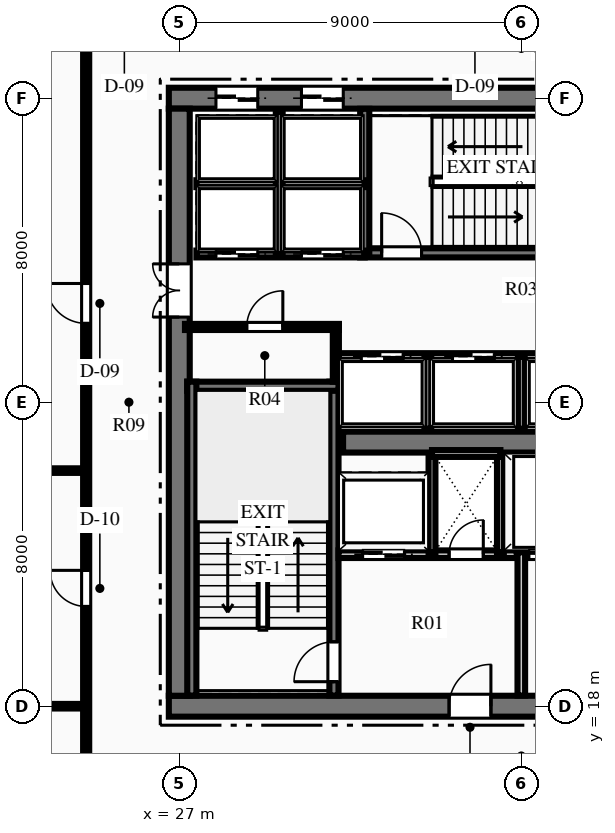
"""IFC4 building model, lengths in metres.
Left out: names, types, materials, properties, quantities, classifications, styles, units other than length and angle.
Written with IfcOpenShell. Run it as: python <this file> out.ifc"""

import sys

from ifc_helpers import new_model, si_unit, direction, frame, frame_2d, origin, place, context, subcontext, project, spatial, rectangle, extrude, element, fill, save


model = new_model("IFC4")
c1 = context("Model", 3, precision=1e-05, world=origin(), true_north=direction((0.0, 1.0)))
c2 = subcontext(c1, "Body", "Model", "MODEL_VIEW")
j1 = project(units=[si_unit("LENGTHUNIT", "METRE"), si_unit("PLANEANGLEUNIT", "RADIAN")], contexts=[c1])
p1 = place(None, origin())
s1 = spatial("IfcSite", under=j1, at=p1, CompositionType="ELEMENT")
p2 = place(p1, origin())
s2 = spatial("IfcBuilding", under=s1, at=p2, CompositionType="ELEMENT")
p3 = place(p2, frame((0.0, 0.0, 127.95)))
s3 = spatial("IfcBuildingStorey", under=s2, at=p3, CompositionType="ELEMENT", Elevation=127.95)
p4 = place(p3, frame((26.725, 18.0, 0.0), z_axis=(0.0, 0.0, 1.0), x_axis=(1.0, 0.0, 0.0)))
e1 = element("IfcWall", 1, at=p4, inside=s3, PredefinedType="SHEAR", context=c2, shape_type="SweptSolid", body=[
    extrude(rectangle(XDim=18.55, YDim=0.55, at=frame_2d((9.275, 0.0))), origin(), (0.0, 0.0, 1.0), 3.75),
])
p5 = place(p4, frame((7.375, 0.0, 0.0)))
e2 = element("IfcOpeningElement", 2, at=p5, cuts=e1, PredefinedType="OPENING", context=c2, shape_type="SweptSolid", body=[
    extrude(rectangle(XDim=1.1, YDim=2.15, at=frame_2d((0.55, 1.075))), frame((0.0, 0.285, 0.0), z_axis=(0.0, -1.0, 0.0), x_axis=(1.0, 0.0, 0.0)), (0.0, 0.0, 1.0), 0.57),
])
p6 = place(p4, frame((10.075, 0.0, 0.0)))
e3 = element("IfcOpeningElement", 3, at=p6, cuts=e1, PredefinedType="OPENING", context=c2, shape_type="SweptSolid", body=[
    extrude(rectangle(XDim=1.1, YDim=2.15, at=frame_2d((0.55, 1.075))), frame((0.0, 0.285, 0.0), z_axis=(0.0, -1.0, 0.0), x_axis=(1.0, 0.0, 0.0)), (0.0, 0.0, 1.0), 0.57),
])
p7 = place(p3, frame((26.725, 34.0, 0.0), z_axis=(0.0, 0.0, 1.0), x_axis=(1.0, 0.0, 0.0)))
e4 = element("IfcWall", 4, at=p7, inside=s3, PredefinedType="SHEAR", context=c2, shape_type="SweptSolid", body=[
    extrude(rectangle(XDim=18.55, YDim=0.55, at=frame_2d((9.275, 0.0))), origin(), (0.0, 0.0, 1.0), 3.75),
])
p8 = place(p7, frame((1.24, 0.0, 0.0)))
e5 = element("IfcOpeningElement", 5, at=p8, cuts=e4, PredefinedType="OPENING", context=c2, shape_type="SweptSolid", body=[
    extrude(rectangle(XDim=1.1, YDim=2.15, at=frame_2d((0.55, 1.075))), frame((0.0, 0.285, 0.0), z_axis=(0.0, -1.0, 0.0), x_axis=(1.0, 0.0, 0.0)), (0.0, 0.0, 1.0), 0.57),
])
p9 = place(p7, frame((3.49, 0.0, 0.0)))
e6 = element("IfcOpeningElement", 6, at=p9, cuts=e4, PredefinedType="OPENING", context=c2, shape_type="SweptSolid", body=[
    extrude(rectangle(XDim=1.1, YDim=2.15, at=frame_2d((0.55, 1.075))), frame((0.0, 0.285, 0.0), z_axis=(0.0, -1.0, 0.0), x_axis=(1.0, 0.0, 0.0)), (0.0, 0.0, 1.0), 0.57),
])
p10 = place(p7, frame((13.96, 0.0, 0.0)))
e7 = element("IfcOpeningElement", 7, at=p10, cuts=e4, PredefinedType="OPENING", context=c2, shape_type="SweptSolid", body=[
    extrude(rectangle(XDim=1.1, YDim=2.15, at=frame_2d((0.55, 1.075))), frame((0.0, 0.285, 0.0), z_axis=(0.0, -1.0, 0.0), x_axis=(1.0, 0.0, 0.0)), (0.0, 0.0, 1.0), 0.57),
])
p11 = place(p7, frame((16.21, 0.0, 0.0)))
e8 = element("IfcOpeningElement", 8, at=p11, cuts=e4, PredefinedType="OPENING", context=c2, shape_type="SweptSolid", body=[
    extrude(rectangle(XDim=1.1, YDim=2.15, at=frame_2d((0.55, 1.075))), frame((0.0, 0.285, 0.0), z_axis=(0.0, -1.0, 0.0), x_axis=(1.0, 0.0, 0.0)), (0.0, 0.0, 1.0), 0.57),
])
p12 = place(p3, frame((27.0, 18.275, 0.0), z_axis=(0.0, 0.0, 1.0), x_axis=(0.0, 1.0, 0.0)))
e9 = element("IfcWall", 9, at=p12, inside=s3, PredefinedType="SHEAR", context=c2, shape_type="SweptSolid", body=[
    extrude(rectangle(XDim=15.45, YDim=0.55, at=frame_2d((7.725, 0.0))), origin(), (0.0, 0.0, 1.0), 3.75),
])
p13 = place(p12, frame((9.965, 0.0, 0.0)))
e10 = element("IfcOpeningElement", 10, at=p13, cuts=e9, PredefinedType="OPENING", context=c2, shape_type="SweptSolid", body=[
    extrude(rectangle(XDim=1.4, YDim=2.2, at=frame_2d((0.7, 1.1))), frame((0.0, 0.285, 0.0), z_axis=(0.0, -1.0, 0.0), x_axis=(1.0, 0.0, 0.0)), (0.0, 0.0, 1.0), 0.57),
])
p14 = place(p3, frame((31.31, 24.95, 0.0), z_axis=(0.0, 0.0, 1.0), x_axis=(1.0, 0.0, 0.0)))
e11 = element("IfcWall", 11, at=p14, inside=s3, PredefinedType="SHEAR", context=c2, shape_type="SweptSolid", body=[
    extrude(rectangle(XDim=9.38, YDim=0.55, at=frame_2d((4.69, 0.0))), origin(), (0.0, 0.0, 1.0), 3.75),
])
p15 = place(p3, frame((31.07, 18.28, 0.0), z_axis=(0.0, 0.0, 1.0), x_axis=(0.0, 1.0, 0.0)))
e12 = element("IfcWall", 12, at=p15, inside=s3, PredefinedType="SHEAR", context=c2, shape_type="SweptSolid", body=[
    extrude(rectangle(XDim=8.26, YDim=0.24, at=frame_2d((4.13, 0.0))), origin(), (0.0, 0.0, 1.0), 3.75),
])
p16 = place(p15, frame((0.365, 0.0, 0.0)))
e13 = element("IfcOpeningElement", 13, at=p16, cuts=e12, PredefinedType="OPENING", context=c2, shape_type="SweptSolid", body=[
    extrude(rectangle(XDim=1.05, YDim=2.15, at=frame_2d((0.525, 1.075))), frame((0.0, 0.13, 0.0), z_axis=(0.0, -1.0, 0.0), x_axis=(1.0, 0.0, 0.0)), (0.0, 0.0, 1.0), 0.26),
])
p17 = place(p3, frame((27.21, 26.42, 0.0), z_axis=(0.0, 0.0, 1.0), x_axis=(1.0, 0.0, 0.0)))
e14 = element("IfcWall", 14, at=p17, inside=s3, PredefinedType="SHEAR", context=c2, shape_type="SweptSolid", body=[
    extrude(rectangle(XDim=3.98, YDim=0.24, at=frame_2d((1.99, 0.0))), origin(), (0.0, 0.0, 1.0), 3.75),
])
p18 = place(p3, frame((27.33, 18.28, 0.0), z_axis=(0.0, 0.0, 1.0), x_axis=(0.0, 1.0, 0.0)))
e15 = element("IfcWall", 15, at=p18, inside=s3, PredefinedType="SHEAR", context=c2, shape_type="SweptSolid", body=[
    extrude(rectangle(XDim=8.26, YDim=0.24, at=frame_2d((4.13, 0.0))), origin(), (0.0, 0.0, 1.0), 3.75),
])
p19 = place(p3, frame((31.76, 29.93, 0.0), z_axis=(0.0, 0.0, 1.0), x_axis=(1.0, 0.0, 0.0)))
e16 = element("IfcWall", 16, at=p19, inside=s3, PredefinedType="SHEAR", context=c2, shape_type="SweptSolid", body=[
    extrude(rectangle(XDim=8.38, YDim=0.24, at=frame_2d((4.19, 0.0))), origin(), (0.0, 0.0, 1.0), 3.75),
])
p20 = place(p19, frame((0.565, 0.0, 0.0)))
e17 = element("IfcOpeningElement", 17, at=p20, cuts=e16, PredefinedType="OPENING", context=c2, shape_type="SweptSolid", body=[
    extrude(rectangle(XDim=1.05, YDim=2.15, at=frame_2d((0.525, 1.075))), frame((0.0, 0.13, 0.0), z_axis=(0.0, -1.0, 0.0), x_axis=(1.0, 0.0, 0.0)), (0.0, 0.0, 1.0), 0.26),
])
p21 = place(p3, frame((31.88, 29.93, 0.0), z_axis=(0.0, 0.0, 1.0), x_axis=(0.0, 1.0, 0.0)))
e18 = element("IfcWall", 18, at=p21, inside=s3, PredefinedType="SHEAR", context=c2, shape_type="SweptSolid", body=[
    extrude(rectangle(XDim=3.79, YDim=0.24, at=frame_2d((1.895, 0.0))), origin(), (0.0, 0.0, 1.0), 3.75),
])
p22 = place(p3, frame((36.0, 18.28, 0.0), z_axis=(0.0, 0.0, 1.0), x_axis=(0.0, 1.0, 0.0)))
e19 = element("IfcWall", 19, at=p22, inside=s3, PredefinedType="PARTITIONING", context=c2, shape_type="SweptSolid", body=[
    extrude(rectangle(XDim=3.77, YDim=0.2, at=frame_2d((1.885, 0.0))), origin(), (0.0, 0.0, 1.0), 3.4),
])
p23 = place(p3, frame((31.19, 22.0, 0.0), z_axis=(0.0, 0.0, 1.0), x_axis=(1.0, 0.0, 0.0)))
e20 = element("IfcWall", 20, at=p23, inside=s3, PredefinedType="PARTITIONING", context=c2, shape_type="SweptSolid", body=[
    extrude(rectangle(XDim=4.69, YDim=0.2, at=frame_2d((2.345, 0.0))), origin(), (0.0, 0.0, 1.0), 3.4),
])
p24 = place(p23, frame((2.91, 0.0, 0.0)))
e21 = element("IfcOpeningElement", 21, at=p24, cuts=e20, PredefinedType="OPENING", context=c2, shape_type="SweptSolid", body=[
    extrude(rectangle(XDim=0.9, YDim=2.15, at=frame_2d((0.45, 1.075))), frame((0.0, 0.11, 0.0), z_axis=(0.0, -1.0, 0.0), x_axis=(1.0, 0.0, 0.0)), (0.0, 0.0, 1.0), 0.22),
])
p25 = place(p23, frame((0.635, 0.0, 0.0)))
e22 = element("IfcOpeningElement", 22, at=p25, cuts=e20, PredefinedType="OPENING", context=c2, shape_type="SweptSolid", body=[
    extrude(rectangle(XDim=1.1, YDim=2.15, at=frame_2d((0.55, 1.075))), frame((0.0, 0.11, 0.0), z_axis=(0.0, -1.0, 0.0), x_axis=(1.0, 0.0, 0.0)), (0.0, 0.0, 1.0), 0.22),
])
p26 = place(p3, frame((36.12, 22.0, 0.0), z_axis=(0.0, 0.0, 1.0), x_axis=(1.0, 0.0, 0.0)))
e23 = element("IfcWall", 23, at=p26, inside=s3, PredefinedType="PARTITIONING", context=c2, shape_type="SweptSolid", body=[
    extrude(rectangle(XDim=4.69, YDim=0.2, at=frame_2d((2.345, 0.0))), origin(), (0.0, 0.0, 1.0), 3.4),
])
p27 = place(p26, frame((2.955, 0.0, 0.0)))
e24 = element("IfcOpeningElement", 24, at=p27, cuts=e23, PredefinedType="OPENING", context=c2, shape_type="SweptSolid", body=[
    extrude(rectangle(XDim=1.1, YDim=2.15, at=frame_2d((0.55, 1.075))), frame((0.0, 0.11, 0.0), z_axis=(0.0, -1.0, 0.0), x_axis=(1.0, 0.0, 0.0)), (0.0, 0.0, 1.0), 0.22),
])
p28 = place(p26, frame((0.08, 0.0, 0.0)))
e25 = element("IfcOpeningElement", 25, at=p28, cuts=e23, PredefinedType="OPENING", context=c2, shape_type="SweptSolid", body=[
    extrude(rectangle(XDim=1.4, YDim=2.2, at=frame_2d((0.7, 1.1))), frame((0.0, 0.11, 0.0), z_axis=(0.0, -1.0, 0.0), x_axis=(1.0, 0.0, 0.0)), (0.0, 0.0, 1.0), 0.22),
])
for number, where, z_axis, x_axis in (
    (26, (33.65, 22.05, 0.0), (0.0, 0.0, 1.0), (0.0, 1.0, 0.0)),
    (27, (35.45, 22.05, 0.0), (0.0, 0.0, 1.0), (0.0, 1.0, 0.0)),
):
    element("IfcWall", number, at=place(p3, frame(where, z_axis=z_axis, x_axis=x_axis)), inside=s3, PredefinedType="PARTITIONING", context=c2, shape_type="SweptSolid", body=[
        extrude(rectangle(XDim=2.6, YDim=0.18, at=frame_2d((1.3, 0.0))), origin(), (0.0, 0.0, 1.0), 3.4),
    ])
p29 = place(p3, frame((33.65, 24.65, 0.0), z_axis=(0.0, 0.0, 1.0), x_axis=(1.0, 0.0, 0.0)))
e28 = element("IfcWall", 28, at=p29, inside=s3, PredefinedType="PARTITIONING", context=c2, shape_type="SweptSolid", body=[
    extrude(rectangle(XDim=1.8, YDim=0.18, at=frame_2d((0.9, 0.0))), origin(), (0.0, 0.0, 1.0), 3.4),
])
p30 = place(p3, frame((27.15, 27.98, 0.0), z_axis=(0.0, 0.0, 1.0), x_axis=(1.0, 0.0, 0.0)))
e29 = element("IfcWall", 29, at=p30, inside=s3, PredefinedType="PARTITIONING", context=c2, shape_type="SweptSolid", body=[
    extrude(rectangle(XDim=4.05, YDim=0.16, at=frame_2d((2.025, 0.0))), origin(), (0.0, 0.0, 1.0), 3.4),
])
p31 = place(p30, frame((1.625, 0.0, 0.0)))
e30 = element("IfcOpeningElement", 30, at=p31, cuts=e29, PredefinedType="OPENING", context=c2, shape_type="SweptSolid", body=[
    extrude(rectangle(XDim=0.95, YDim=2.15, at=frame_2d((0.475, 1.075))), frame((0.0, 0.09, 0.0), z_axis=(0.0, -1.0, 0.0), x_axis=(1.0, 0.0, 0.0)), (0.0, 0.0, 1.0), 0.18),
])
p32 = place(p3, frame((31.12, 26.54, 0.0), z_axis=(0.0, 0.0, 1.0), x_axis=(0.0, 1.0, 0.0)))
e31 = element("IfcWall", 31, at=p32, inside=s3, PredefinedType="PARTITIONING", context=c2, shape_type="SweptSolid", body=[
    extrude(rectangle(XDim=1.51, YDim=0.16, at=frame_2d((0.755, 0.0))), origin(), (0.0, 0.0, 1.0), 3.4),
])
p33 = place(p3, frame((27.45, 29.9, 0.0), z_axis=(0.0, 0.0, 1.0), x_axis=(1.0, 0.0, 0.0)))
e32 = element("IfcWall", 32, at=p33, inside=s3, PredefinedType="PARTITIONING", context=c2, shape_type="SweptSolid", body=[
    extrude(rectangle(XDim=4.43, YDim=0.18, at=frame_2d((2.215, 0.0))), origin(), (0.0, 0.0, 1.0), 3.4),
])
p34 = place(p33, frame((0.515, 0.0, 0.0)))
e33 = element("IfcOpeningElement", 33, at=p34, cuts=e32, PredefinedType="OPENING", context=c2, shape_type="SweptSolid", body=[
    extrude(rectangle(XDim=1.1, YDim=2.15, at=frame_2d((0.55, 1.075))), frame((0.0, 0.1, 0.0), z_axis=(0.0, -1.0, 0.0), x_axis=(1.0, 0.0, 0.0)), (0.0, 0.0, 1.0), 0.2),
])
p35 = place(p33, frame((2.765, 0.0, 0.0)))
e34 = element("IfcOpeningElement", 34, at=p35, cuts=e32, PredefinedType="OPENING", context=c2, shape_type="SweptSolid", body=[
    extrude(rectangle(XDim=1.1, YDim=2.15, at=frame_2d((0.55, 1.075))), frame((0.0, 0.1, 0.0), z_axis=(0.0, -1.0, 0.0), x_axis=(1.0, 0.0, 0.0)), (0.0, 0.0, 1.0), 0.2),
])
p36 = place(p3, frame((27.45, 31.75, 0.0), z_axis=(0.0, 0.0, 1.0), x_axis=(1.0, 0.0, 0.0)))
e35 = element("IfcWall", 35, at=p36, inside=s3, PredefinedType="PARTITIONING", context=c2, shape_type="SweptSolid", body=[
    extrude(rectangle(XDim=4.43, YDim=0.18, at=frame_2d((2.215, 0.0))), origin(), (0.0, 0.0, 1.0), 3.4),
])
p37 = place(p3, frame((29.63, 29.9, 0.0), z_axis=(0.0, 0.0, 1.0), x_axis=(0.0, 1.0, 0.0)))
e36 = element("IfcWall", 36, at=p37, inside=s3, PredefinedType="PARTITIONING", context=c2, shape_type="SweptSolid", body=[
    extrude(rectangle(XDim=3.75, YDim=0.18, at=frame_2d((1.875, 0.0))), origin(), (0.0, 0.0, 1.0), 3.4),
])
p38 = place(p3, frame((31.2, 27.2, 0.0), z_axis=(0.0, 0.0, 1.0), x_axis=(1.0, 0.0, 0.0)))
e37 = element("IfcWall", 37, at=p38, inside=s3, PredefinedType="PARTITIONING", context=c2, shape_type="SweptSolid", body=[
    extrude(rectangle(XDim=9.6, YDim=0.18, at=frame_2d((4.8, 0.0))), origin(), (0.0, 0.0, 1.0), 3.4),
])
p39 = place(p38, frame((0.59, 0.0, 0.0)))
e38 = element("IfcOpeningElement", 38, at=p39, cuts=e37, PredefinedType="OPENING", context=c2, shape_type="SweptSolid", body=[
    extrude(rectangle(XDim=1.1, YDim=2.15, at=frame_2d((0.55, 1.075))), frame((0.0, 0.1, 0.0), z_axis=(0.0, -1.0, 0.0), x_axis=(1.0, 0.0, 0.0)), (0.0, 0.0, 1.0), 0.2),
])
p40 = place(p38, frame((2.99, 0.0, 0.0)))
e39 = element("IfcOpeningElement", 39, at=p40, cuts=e37, PredefinedType="OPENING", context=c2, shape_type="SweptSolid", body=[
    extrude(rectangle(XDim=1.1, YDim=2.15, at=frame_2d((0.55, 1.075))), frame((0.0, 0.1, 0.0), z_axis=(0.0, -1.0, 0.0), x_axis=(1.0, 0.0, 0.0)), (0.0, 0.0, 1.0), 0.2),
])
p41 = place(p38, frame((5.51, 0.0, 0.0)))
e40 = element("IfcOpeningElement", 40, at=p41, cuts=e37, PredefinedType="OPENING", context=c2, shape_type="SweptSolid", body=[
    extrude(rectangle(XDim=1.1, YDim=2.15, at=frame_2d((0.55, 1.075))), frame((0.0, 0.1, 0.0), z_axis=(0.0, -1.0, 0.0), x_axis=(1.0, 0.0, 0.0)), (0.0, 0.0, 1.0), 0.2),
])
p42 = place(p38, frame((7.91, 0.0, 0.0)))
e41 = element("IfcOpeningElement", 41, at=p42, cuts=e37, PredefinedType="OPENING", context=c2, shape_type="SweptSolid", body=[
    extrude(rectangle(XDim=1.1, YDim=2.15, at=frame_2d((0.55, 1.075))), frame((0.0, 0.1, 0.0), z_axis=(0.0, -1.0, 0.0), x_axis=(1.0, 0.0, 0.0)), (0.0, 0.0, 1.0), 0.2),
])
for number, where, z_axis, x_axis in (
    (42, (33.54, 25.3, 0.0), (0.0, 0.0, 1.0), (0.0, 1.0, 0.0)),
    (43, (36.0, 25.3, 0.0), (0.0, 0.0, 1.0), (0.0, 1.0, 0.0)),
):
    element("IfcWall", number, at=place(p3, frame(where, z_axis=z_axis, x_axis=x_axis)), inside=s3, PredefinedType="PARTITIONING", context=c2, shape_type="SweptSolid", body=[
        extrude(rectangle(XDim=1.9, YDim=0.18, at=frame_2d((0.95, 0.0))), origin(), (0.0, 0.0, 1.0), 3.4),
    ])
p43 = place(p3, frame((24.55, 15.55, 0.0), z_axis=(0.0, 0.0, 1.0), x_axis=(0.0, 1.0, 0.0)))
e44 = element("IfcWall", 44, at=p43, inside=s3, PredefinedType="PARTITIONING", context=c2, shape_type="SweptSolid", body=[
    extrude(rectangle(XDim=20.9, YDim=0.16, at=frame_2d((10.45, 0.0))), origin(), (0.0, 0.0, 1.0), 3.4),
])
p44 = place(p43, frame((5.075, 0.0, 0.0)))
e45 = element("IfcOpeningElement", 45, at=p44, cuts=e44, PredefinedType="OPENING", context=c2, shape_type="SweptSolid", body=[
    extrude(rectangle(XDim=0.95, YDim=2.15, at=frame_2d((0.475, 1.075))), frame((0.0, 0.09, 0.0), z_axis=(0.0, -1.0, 0.0), x_axis=(1.0, 0.0, 0.0)), (0.0, 0.0, 1.0), 0.18),
])
p45 = place(p43, frame((12.524, 0.0, 0.0)))
e46 = element("IfcOpeningElement", 46, at=p45, cuts=e44, PredefinedType="OPENING", context=c2, shape_type="SweptSolid", body=[
    extrude(rectangle(XDim=1.05, YDim=2.15, at=frame_2d((0.525, 1.075))), frame((0.0, 0.09, 0.0), z_axis=(0.0, -1.0, 0.0), x_axis=(1.0, 0.0, 0.0)), (0.0, 0.0, 1.0), 0.18),
])
p46 = place(p3, frame((20.2, 18.0, 0.0), z_axis=(0.0, 0.0, 1.0), x_axis=(1.0, 0.0, 0.0)))
e47 = element("IfcWall", 47, at=p46, inside=s3, PredefinedType="PARTITIONING", context=c2, shape_type="SweptSolid", body=[
    extrude(rectangle(XDim=4.35, YDim=0.12, at=frame_2d((2.175, 0.0))), origin(), (0.0, 0.0, 1.0), 2.699),
])
p47 = place(p3, frame((20.2, 24.2, 0.0), z_axis=(0.0, 0.0, 1.0), x_axis=(1.0, 0.0, 0.0)))
e48 = element("IfcWall", 48, at=p47, inside=s3, PredefinedType="PARTITIONING", context=c2, shape_type="SweptSolid", body=[
    extrude(rectangle(XDim=4.35, YDim=0.12, at=frame_2d((2.175, 0.0))), origin(), (0.0, 0.0, 1.0), 3.4),
])
p48 = place(p31, origin())
e49 = element("IfcDoor", 49, at=p48, inside=s3, OperationType="SINGLE_SWING_RIGHT", PredefinedType="DOOR", context=c2, shape_type="SweptSolid", body=[
    extrude(rectangle(XDim=0.95, YDim=2.15, at=frame_2d((0.475, 1.075))), frame((0.0, 0.025, 0.0), z_axis=(0.0, -1.0, 0.0), x_axis=(1.0, 0.0, 0.0)), (0.0, 0.0, 1.0), 0.05),
])
fill(e30, e49)
p49 = place(p16, origin())
e50 = element("IfcDoor", 50, at=p49, inside=s3, OperationType="SINGLE_SWING_LEFT", PredefinedType="DOOR", context=c2, shape_type="SweptSolid", body=[
    extrude(rectangle(XDim=1.05, YDim=2.15, at=frame_2d((0.525, 1.075))), frame((0.0, 0.025, 0.0), z_axis=(0.0, -1.0, 0.0), x_axis=(1.0, 0.0, 0.0)), (0.0, 0.0, 1.0), 0.05),
])
fill(e13, e50)
p50 = place(p20, origin())
e51 = element("IfcDoor", 51, at=p50, inside=s3, OperationType="SINGLE_SWING_LEFT", PredefinedType="DOOR", context=c2, shape_type="SweptSolid", body=[
    extrude(rectangle(XDim=1.05, YDim=2.15, at=frame_2d((0.525, 1.075))), frame((0.0, 0.025, 0.0), z_axis=(0.0, -1.0, 0.0), x_axis=(1.0, 0.0, 0.0)), (0.0, 0.0, 1.0), 0.05),
])
fill(e17, e51)
p51 = place(p5, origin())
e52 = element("IfcDoor", 52, at=p51, inside=s3, OperationType="SINGLE_SWING_RIGHT", PredefinedType="DOOR", context=c2, shape_type="SweptSolid", body=[
    extrude(rectangle(XDim=1.1, YDim=2.15, at=frame_2d((0.55, 1.075))), frame((0.0, 0.025, 0.0), z_axis=(0.0, -1.0, 0.0), x_axis=(1.0, 0.0, 0.0)), (0.0, 0.0, 1.0), 0.05),
])
fill(e2, e52)
p52 = place(p24, origin())
e53 = element("IfcDoor", 53, at=p52, inside=s3, OperationType="SINGLE_SWING_RIGHT", PredefinedType="DOOR", context=c2, shape_type="SweptSolid", body=[
    extrude(rectangle(XDim=0.9, YDim=2.15, at=frame_2d((0.45, 1.075))), frame((0.0, 0.025, 0.0), z_axis=(0.0, -1.0, 0.0), x_axis=(1.0, 0.0, 0.0)), (0.0, 0.0, 1.0), 0.05),
])
fill(e21, e53)
p53 = place(p13, origin())
e54 = element("IfcDoor", 54, at=p53, inside=s3, OperationType="DOUBLE_DOOR_SINGLE_SWING", PredefinedType="DOOR", context=c2, shape_type="SweptSolid", body=[
    extrude(rectangle(XDim=1.4, YDim=2.2, at=frame_2d((0.7, 1.1))), frame((0.0, 0.025, 0.0), z_axis=(0.0, -1.0, 0.0), x_axis=(1.0, 0.0, 0.0)), (0.0, 0.0, 1.0), 0.05),
])
fill(e10, e54)
p54 = place(p44, origin())
e55 = element("IfcDoor", 55, at=p54, inside=s3, OperationType="SINGLE_SWING_RIGHT", PredefinedType="DOOR", context=c2, shape_type="SweptSolid", body=[
    extrude(rectangle(XDim=0.95, YDim=2.15, at=frame_2d((0.475, 1.075))), frame((0.0, 0.025, 0.0), z_axis=(0.0, -1.0, 0.0), x_axis=(1.0, 0.0, 0.0)), (0.0, 0.0, 1.0), 0.05),
])
fill(e45, e55)
p55 = place(p45, origin())
e56 = element("IfcDoor", 56, at=p55, inside=s3, OperationType="SINGLE_SWING_RIGHT", PredefinedType="DOOR", context=c2, shape_type="SweptSolid", body=[
    extrude(rectangle(XDim=1.05, YDim=2.15, at=frame_2d((0.525, 1.075))), frame((0.0, 0.025, 0.0), z_axis=(0.0, -1.0, 0.0), x_axis=(1.0, 0.0, 0.0)), (0.0, 0.0, 1.0), 0.05),
])
fill(e46, e56)
p56 = place(p34, origin())
e57 = element("IfcDoor", 57, at=p56, inside=s3, OperationType="SLIDING_TO_LEFT", PredefinedType="DOOR", context=c2, shape_type="SweptSolid", body=[
    extrude(rectangle(XDim=1.1, YDim=2.15, at=frame_2d((0.55, 1.075))), frame((0.0, 0.025, 0.0), z_axis=(0.0, -1.0, 0.0), x_axis=(1.0, 0.0, 0.0)), (0.0, 0.0, 1.0), 0.05),
])
fill(e33, e57)
p57 = place(p35, origin())
e58 = element("IfcDoor", 58, at=p57, inside=s3, OperationType="SLIDING_TO_LEFT", PredefinedType="DOOR", context=c2, shape_type="SweptSolid", body=[
    extrude(rectangle(XDim=1.1, YDim=2.15, at=frame_2d((0.55, 1.075))), frame((0.0, 0.025, 0.0), z_axis=(0.0, -1.0, 0.0), x_axis=(1.0, 0.0, 0.0)), (0.0, 0.0, 1.0), 0.05),
])
fill(e34, e58)
p58 = place(p8, origin())
e59 = element("IfcDoor", 59, at=p58, inside=s3, OperationType="SLIDING_TO_LEFT", PredefinedType="DOOR", context=c2, shape_type="SweptSolid", body=[
    extrude(rectangle(XDim=1.1, YDim=2.15, at=frame_2d((0.55, 1.075))), frame((0.0, 0.025, 0.0), z_axis=(0.0, -1.0, 0.0), x_axis=(1.0, 0.0, 0.0)), (0.0, 0.0, 1.0), 0.05),
])
fill(e5, e59)
p59 = place(p9, origin())
e60 = element("IfcDoor", 60, at=p59, inside=s3, OperationType="SLIDING_TO_LEFT", PredefinedType="DOOR", context=c2, shape_type="SweptSolid", body=[
    extrude(rectangle(XDim=1.1, YDim=2.15, at=frame_2d((0.55, 1.075))), frame((0.0, 0.025, 0.0), z_axis=(0.0, -1.0, 0.0), x_axis=(1.0, 0.0, 0.0)), (0.0, 0.0, 1.0), 0.05),
])
fill(e6, e60)
p60 = place(p39, origin())
e61 = element("IfcDoor", 61, at=p60, inside=s3, OperationType="SLIDING_TO_LEFT", PredefinedType="DOOR", context=c2, shape_type="SweptSolid", body=[
    extrude(rectangle(XDim=1.1, YDim=2.15, at=frame_2d((0.55, 1.075))), frame((0.0, 0.025, 0.0), z_axis=(0.0, -1.0, 0.0), x_axis=(1.0, 0.0, 0.0)), (0.0, 0.0, 1.0), 0.05),
])
fill(e38, e61)
p61 = place(p40, origin())
e62 = element("IfcDoor", 62, at=p61, inside=s3, OperationType="SLIDING_TO_LEFT", PredefinedType="DOOR", context=c2, shape_type="SweptSolid", body=[
    extrude(rectangle(XDim=1.1, YDim=2.15, at=frame_2d((0.55, 1.075))), frame((0.0, 0.025, 0.0), z_axis=(0.0, -1.0, 0.0), x_axis=(1.0, 0.0, 0.0)), (0.0, 0.0, 1.0), 0.05),
])
fill(e39, e62)
p62 = place(p25, origin())
e63 = element("IfcDoor", 63, at=p62, inside=s3, OperationType="SLIDING_TO_LEFT", PredefinedType="DOOR", context=c2, shape_type="SweptSolid", body=[
    extrude(rectangle(XDim=1.1, YDim=2.15, at=frame_2d((0.55, 1.075))), frame((0.0, 0.025, 0.0), z_axis=(0.0, -1.0, 0.0), x_axis=(1.0, 0.0, 0.0)), (0.0, 0.0, 1.0), 0.05),
])
fill(e22, e63)
p63 = place(p28, origin())
e64 = element("IfcDoor", 64, at=p63, inside=s3, OperationType="SLIDING_TO_LEFT", PredefinedType="DOOR", context=c2, shape_type="SweptSolid", body=[
    extrude(rectangle(XDim=1.4, YDim=2.2, at=frame_2d((0.7, 1.1))), frame((0.0, 0.025, 0.0), z_axis=(0.0, -1.0, 0.0), x_axis=(1.0, 0.0, 0.0)), (0.0, 0.0, 1.0), 0.05),
])
fill(e25, e64)
save(model, sys.argv[1])
